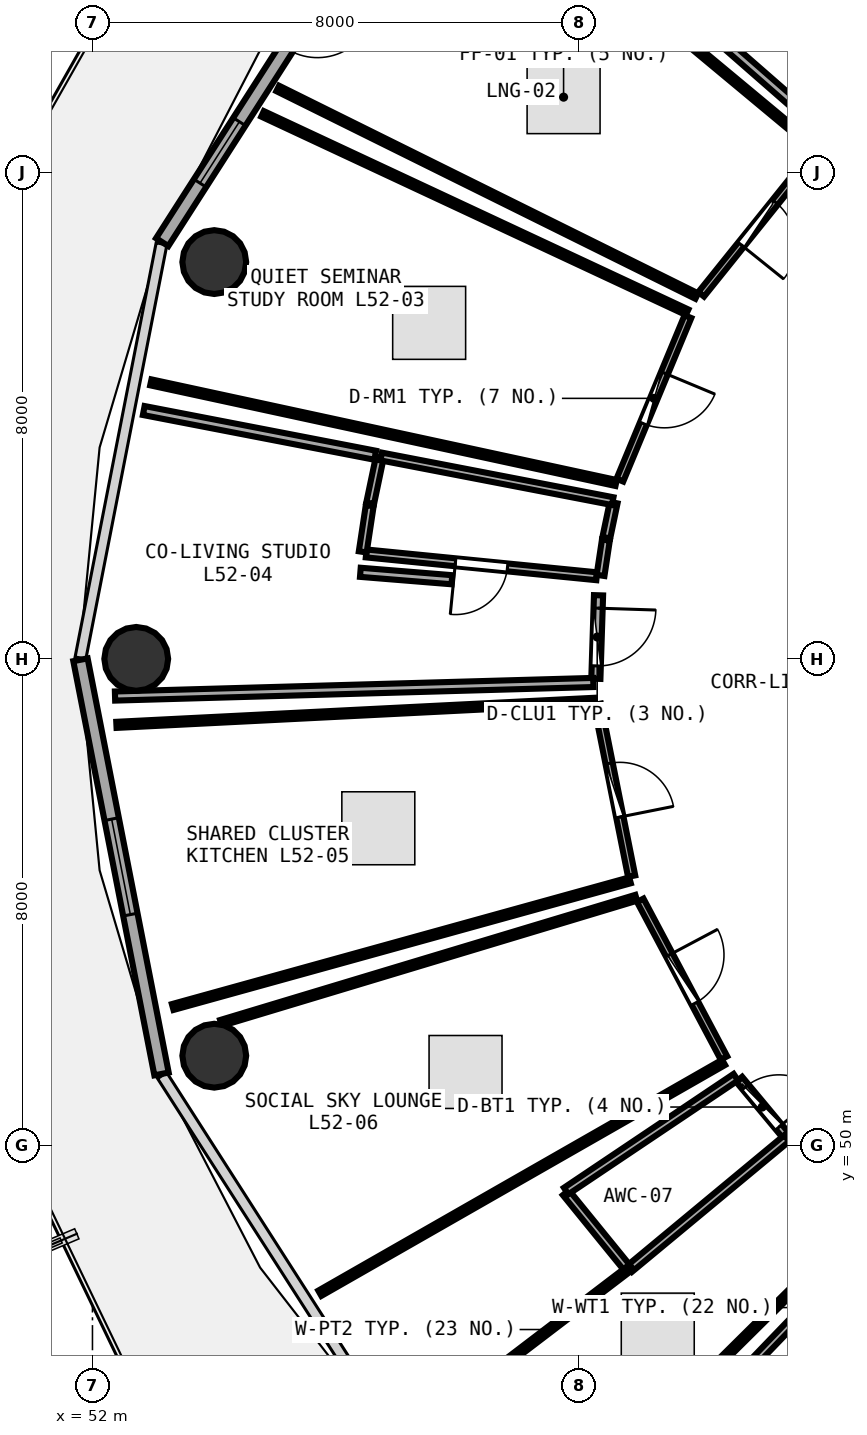
"""IFC4 building model, lengths in metres.
Left out: names, types, materials, properties, quantities, classifications, styles, units other than length and angle.
Written with IfcOpenShell. Run it as: python <this file> out.ifc"""

import sys

from ifc_helpers import new_model, si_unit, direction, frame, frame_2d, origin, origin_2d, place, context, subcontext, project, spatial, rectangle, circle, extrude, element, fill, save


model = new_model("IFC4")
c1 = context("Model", 3, precision=1e-05, world=origin(), true_north=direction((0.0, 1.0)))
c2 = subcontext(c1, "Body", "Model", "MODEL_VIEW")
j1 = project(units=[si_unit("LENGTHUNIT", "METRE"), si_unit("PLANEANGLEUNIT", "RADIAN")], contexts=[c1])
p1 = place(None, origin())
s1 = spatial("IfcSite", under=j1, at=p1, CompositionType="ELEMENT")
p2 = place(p1, origin())
s2 = spatial("IfcBuilding", under=s1, at=p2, CompositionType="ELEMENT")
p3 = place(p2, frame((0.0, 0.0, 204.45)))
s3 = spatial("IfcBuildingStorey", under=s2, at=p3, CompositionType="ELEMENT", Elevation=204.45)
for number, where, z_axis, x_axis in (
    (1, (54.003, 64.526, 0.0), (0.0, 0.0, 1.0), (1.0, 0.0, 0.0)),
    (2, (52.72, 58.0, 0.0), (0.0, 0.0, 1.0), (1.0, 0.0, 0.0)),
    (3, (54.003, 51.474, 0.0), (0.0, 0.0, 1.0), (1.0, 0.0, 0.0)),
):
    element("IfcColumn", number, at=place(p3, frame(where, z_axis=z_axis, x_axis=x_axis)), inside=s3, PredefinedType="COLUMN", context=c2, shape_type="SweptSolid", body=[
        extrude(circle(Radius=0.525, at=origin_2d()), origin(), (0.0, 0.0, 1.0), 3.75),
    ])
p4 = place(p3, frame((56.986, 70.843, 0.0), z_axis=(0.0, 0.0, 1.0), x_axis=(-0.539539512973, -0.841960280501, 0.0)))
e4 = element("IfcWall", 4, at=p4, inside=s3, PredefinedType="SOLIDWALL", context=c2, shape_type="SweptSolid", body=[
    extrude(rectangle(XDim=7.115, YDim=0.24, at=frame_2d((3.557, 0.0))), origin(), (0.0, 0.0, 1.0), 3.475),
])
p5 = place(p4, frame((2.382, 0.0, 0.0)))
e5 = element("IfcOpeningElement", 5, at=p5, cuts=e4, PredefinedType="OPENING", context=c2, shape_type="SweptSolid", body=[
    extrude(rectangle(XDim=0.95, YDim=2.1, at=frame_2d((0.475, 1.05))), frame((0.0, 0.13, 0.0), z_axis=(0.0, -1.0, 0.0), x_axis=(1.0, 0.0, 0.0)), (0.0, 0.0, 1.0), 0.26),
])
p6 = place(p4, frame((4.762, 0.0, 0.85)))
e6 = element("IfcOpeningElement", 6, at=p6, cuts=e4, PredefinedType="OPENING", context=c2, shape_type="SweptSolid", body=[
    extrude(rectangle(XDim=1.2, YDim=1.45, at=frame_2d((0.6, 0.725))), frame((0.0, 0.13, 0.0), z_axis=(0.0, -1.0, 0.0), x_axis=(1.0, 0.0, 0.0)), (0.0, 0.0, 1.0), 0.26),
])
p7 = place(p3, frame((51.803, 57.985, 0.0), z_axis=(0.0, 0.0, 1.0), x_axis=(0.192069055673, -0.981381413036, 0.0)))
e7 = element("IfcWall", 7, at=p7, inside=s3, PredefinedType="SOLIDWALL", context=c2, shape_type="SweptSolid", body=[
    extrude(rectangle(XDim=6.94, YDim=0.24, at=frame_2d((3.47, 0.0))), origin(), (0.0, 0.0, 1.0), 3.475),
])
p8 = place(p7, frame((2.67, 0.0, 0.85)))
e8 = element("IfcOpeningElement", 8, at=p8, cuts=e7, PredefinedType="OPENING", context=c2, shape_type="SweptSolid", body=[
    extrude(rectangle(XDim=1.6, YDim=1.45, at=frame_2d((0.8, 0.725))), frame((0.0, 0.13, 0.0), z_axis=(0.0, -1.0, 0.0), x_axis=(1.0, 0.0, 0.0)), (0.0, 0.0, 1.0), 0.26),
])
p9 = place(p3, frame((65.56, 67.798, 0.0), z_axis=(0.0, 0.0, 1.0), x_axis=(-0.652591857515, 0.757709619515, 0.0)))
e9 = element("IfcWall", 9, at=p9, inside=s3, PredefinedType="PLUMBINGWALL", context=c2, shape_type="SweptSolid", body=[
    extrude(rectangle(XDim=3.57, YDim=0.13, at=frame_2d((1.785, 0.0))), origin(), (0.0, 0.0, 1.0), 3.025),
])
p10 = place(p9, frame((1.355, 0.0, 0.0)))
e10 = element("IfcOpeningElement", 10, at=p10, cuts=e9, PredefinedType="OPENING", context=c2, shape_type="SweptSolid", body=[
    extrude(rectangle(XDim=0.86, YDim=2.05, at=frame_2d((0.43, 1.025))), frame((0.0, 0.075, 0.0), z_axis=(0.0, -1.0, 0.0), x_axis=(1.0, 0.0, 0.0)), (0.0, 0.0, 1.0), 0.15),
])
p11 = place(p3, frame((63.885, 66.327, 0.0), z_axis=(0.0, 0.0, 1.0), x_axis=(-0.626276824741, -0.779600756023, 0.0)))
e11 = element("IfcWall", 11, at=p11, inside=s3, PredefinedType="PARTITIONING", context=c2, shape_type="SweptSolid", body=[
    extrude(rectangle(XDim=2.99, YDim=0.12, at=frame_2d((1.495, 0.0))), origin(), (0.0, 0.0, 1.0), 3.025),
])
p12 = place(p11, frame((1.045, 0.0, 0.0)))
e12 = element("IfcOpeningElement", 12, at=p12, cuts=e11, PredefinedType="OPENING", context=c2, shape_type="SweptSolid", body=[
    extrude(rectangle(XDim=0.9, YDim=2.08, at=frame_2d((0.45, 1.04))), frame((0.0, 0.07, 0.0), z_axis=(0.0, -1.0, 0.0), x_axis=(1.0, 0.0, 0.0)), (0.0, 0.0, 1.0), 0.14),
])
p13 = place(p3, frame((61.793, 63.629, 0.0), z_axis=(0.0, 0.0, 1.0), x_axis=(-0.384145151494, -0.923272713007, 0.0)))
e13 = element("IfcWall", 13, at=p13, inside=s3, PredefinedType="PARTITIONING", context=c2, shape_type="SweptSolid", body=[
    extrude(rectangle(XDim=2.913, YDim=0.12, at=frame_2d((1.456, 0.0))), origin(), (0.0, 0.0, 1.0), 3.235),
])
p14 = place(p13, frame((1.006, 0.0, 0.0)))
e14 = element("IfcOpeningElement", 14, at=p14, cuts=e13, PredefinedType="OPENING", context=c2, shape_type="SweptSolid", body=[
    extrude(rectangle(XDim=0.9, YDim=2.08, at=frame_2d((0.45, 1.04))), frame((0.0, 0.07, 0.0), z_axis=(0.0, -1.0, 0.0), x_axis=(1.0, 0.0, 0.0)), (0.0, 0.0, 1.0), 0.14),
])
p15 = place(p3, frame((60.293, 59.359, 0.0), z_axis=(0.0, 0.0, 1.0), x_axis=(-0.995138182823, 0.098488563232, 0.0)))
e15 = element("IfcWall", 15, at=p15, inside=s3, PredefinedType="PLUMBINGWALL", context=c2, shape_type="SweptSolid", body=[
    extrude(rectangle(XDim=3.81, YDim=0.13, at=frame_2d((1.905, 0.0))), origin(), (0.0, 0.0, 1.0), 3.175),
])
p16 = place(p15, frame((1.475, 0.0, 0.0)))
e16 = element("IfcOpeningElement", 16, at=p16, cuts=e15, PredefinedType="OPENING", context=c2, shape_type="SweptSolid", body=[
    extrude(rectangle(XDim=0.86, YDim=2.05, at=frame_2d((0.43, 1.025))), frame((0.0, 0.075, 0.0), z_axis=(0.0, -1.0, 0.0), x_axis=(1.0, 0.0, 0.0)), (0.0, 0.0, 1.0), 0.15),
])
p17 = place(p3, frame((60.323, 59.046, 0.0), z_axis=(0.0, 0.0, 1.0), x_axis=(-0.032172559415, -0.999482329219, 0.0)))
e17 = element("IfcWall", 17, at=p17, inside=s3, PredefinedType="PARTITIONING", context=c2, shape_type="SweptSolid", body=[
    extrude(rectangle(XDim=1.374, YDim=0.15, at=frame_2d((0.687, 0.0))), origin(), (0.0, 0.0, 1.0), 3.025),
])
p18 = place(p17, frame((0.212, 0.0, 0.0)))
e18 = element("IfcOpeningElement", 18, at=p18, cuts=e17, PredefinedType="OPENING", context=c2, shape_type="SweptSolid", body=[
    extrude(rectangle(XDim=0.95, YDim=2.08, at=frame_2d((0.475, 1.04))), frame((0.0, 0.085, 0.0), z_axis=(0.0, -1.0, 0.0), x_axis=(1.0, 0.0, 0.0)), (0.0, 0.0, 1.0), 0.17),
])
p19 = place(p3, frame((60.303, 57.253, 0.0), z_axis=(0.0, 0.0, 1.0), x_axis=(0.195904296331, -0.980623019656, 0.0)))
e19 = element("IfcWall", 19, at=p19, inside=s3, PredefinedType="PARTITIONING", context=c2, shape_type="SweptSolid", body=[
    extrude(rectangle(XDim=2.881, YDim=0.12, at=frame_2d((1.441, 0.0))), origin(), (0.0, 0.0, 1.0), 3.48),
])
p20 = place(p19, frame((0.991, 0.0, 0.0)))
e20 = element("IfcOpeningElement", 20, at=p20, cuts=e19, PredefinedType="OPENING", context=c2, shape_type="SweptSolid", body=[
    extrude(rectangle(XDim=0.9, YDim=2.08, at=frame_2d((0.45, 1.04))), frame((0.0, 0.07, 0.0), z_axis=(0.0, -1.0, 0.0), x_axis=(1.0, 0.0, 0.0)), (0.0, 0.0, 1.0), 0.14),
])
p21 = place(p3, frame((61.009, 54.03, 0.0), z_axis=(0.0, 0.0, 1.0), x_axis=(0.468999166779, -0.883198608219, 0.0)))
e21 = element("IfcWall", 21, at=p21, inside=s3, PredefinedType="PARTITIONING", context=c2, shape_type="SweptSolid", body=[
    extrude(rectangle(XDim=2.936, YDim=0.12, at=frame_2d((1.468, 0.0))), origin(), (0.0, 0.0, 1.0), 3.235),
])
p22 = place(p21, frame((1.018, 0.0, 0.0)))
e22 = element("IfcOpeningElement", 22, at=p22, cuts=e21, PredefinedType="OPENING", context=c2, shape_type="SweptSolid", body=[
    extrude(rectangle(XDim=0.9, YDim=2.08, at=frame_2d((0.45, 1.04))), frame((0.0, 0.07, 0.0), z_axis=(0.0, -1.0, 0.0), x_axis=(1.0, 0.0, 0.0)), (0.0, 0.0, 1.0), 0.14),
])
p23 = place(p3, frame((62.635, 51.086, 0.0), z_axis=(0.0, 0.0, 1.0), x_axis=(0.639759255057, -0.768575367526, 0.0)))
e23 = element("IfcWall", 23, at=p23, inside=s3, PredefinedType="PLUMBINGWALL", context=c2, shape_type="SweptSolid", body=[
    extrude(rectangle(XDim=1.187, YDim=0.13, at=frame_2d((0.593, 0.0))), origin(), (0.0, 0.0, 1.0), 3.025),
])
p24 = place(p23, frame((0.163, 0.0, 0.0)))
e24 = element("IfcOpeningElement", 24, at=p24, cuts=e23, PredefinedType="OPENING", context=c2, shape_type="SweptSolid", body=[
    extrude(rectangle(XDim=0.86, YDim=2.05, at=frame_2d((0.43, 1.025))), frame((0.0, 0.075, 0.0), z_axis=(0.0, -1.0, 0.0), x_axis=(1.0, 0.0, 0.0)), (0.0, 0.0, 1.0), 0.15),
])
p25 = place(p3, frame((64.123, 66.618, 0.0), z_axis=(0.0, 0.0, 1.0), x_axis=(-0.752988337425, 0.658033862124, 0.0)))
e25 = element("IfcWall", 25, at=p25, inside=s3, PredefinedType="PARTITIONING", context=c2, shape_type="SweptSolid", body=[
    extrude(rectangle(XDim=7.492, YDim=0.15, at=frame_2d((3.746, 0.0))), origin(), (0.0, 0.0, 1.0), 3.075),
])
p26 = place(p3, frame((61.938, 63.967, 0.0), z_axis=(0.0, 0.0, 1.0), x_axis=(-0.896052906747, 0.443947281003, 0.0)))
e26 = element("IfcWall", 26, at=p26, inside=s3, PredefinedType="PARTITIONING", context=c2, shape_type="SweptSolid", body=[
    extrude(rectangle(XDim=7.691, YDim=0.1, at=frame_2d((3.845, 0.0))), origin(), (0.0, 0.0, 1.0), 3.025),
])
p27 = place(p3, frame((58.117, 71.203, 0.0), z_axis=(0.0, 0.0, 1.0), x_axis=(0.768764498043, -0.63953197461, 0.0)))
e27 = element("IfcWall", 27, at=p27, inside=s3, PredefinedType="PARTITIONING", context=c2, shape_type="SweptSolid", body=[
    extrude(rectangle(XDim=7.511, YDim=0.1, at=frame_2d((3.756, 0.0))), origin(), (0.0, 0.0, 1.0), 3.025),
])
p28 = place(p3, frame((60.612, 60.893, 0.0), z_axis=(0.0, 0.0, 1.0), x_axis=(-0.977397622815, 0.211409287676, 0.0)))
e28 = element("IfcWall", 28, at=p28, inside=s3, PredefinedType="PARTITIONING", context=c2, shape_type="SweptSolid", body=[
    extrude(rectangle(XDim=7.829, YDim=0.1, at=frame_2d((3.914, 0.0))), origin(), (0.0, 0.0, 1.0), 3.075),
])
p29 = place(p3, frame((54.797, 66.963, 0.0), z_axis=(0.0, 0.0, 1.0), x_axis=(0.906002589331, -0.423272144283, 0.0)))
e29 = element("IfcWall", 29, at=p29, inside=s3, PredefinedType="PARTITIONING", context=c2, shape_type="SweptSolid", body=[
    extrude(rectangle(XDim=7.707, YDim=0.1, at=frame_2d((3.854, 0.0))), origin(), (0.0, 0.0, 1.0), 3.025),
])
p30 = place(p3, frame((60.572, 60.57, 0.0), z_axis=(0.0, 0.0, 1.0), x_axis=(-0.205112412682, -0.978738421727, 0.0)))
e30 = element("IfcWall", 30, at=p30, inside=s3, PredefinedType="PLUMBINGWALL", context=c2, shape_type="SweptSolid", body=[
    extrude(rectangle(XDim=0.589, YDim=0.13, at=frame_2d((0.294, 0.0))), origin(), (0.0, 0.0, 1.0), 3.48),
])
p31 = place(p3, frame((60.444, 59.954, 0.0), z_axis=(0.0, 0.0, 1.0), x_axis=(-0.149903785265, -0.98870058924, 0.0)))
e31 = element("IfcWall", 31, at=p31, inside=s3, PredefinedType="PLUMBINGWALL", context=c2, shape_type="SweptSolid", body=[
    extrude(rectangle(XDim=0.588, YDim=0.13, at=frame_2d((0.294, 0.0))), origin(), (0.0, 0.0, 1.0), 3.48),
])
p32 = place(p3, frame((56.445, 59.76, 0.0), z_axis=(0.0, 0.0, 1.0), x_axis=(0.149504479532, 0.988761048282, 0.0)))
e32 = element("IfcWall", 32, at=p32, inside=s3, PredefinedType="PLUMBINGWALL", context=c2, shape_type="SweptSolid", body=[
    extrude(rectangle(XDim=0.769, YDim=0.13, at=frame_2d((0.385, 0.0))), origin(), (0.0, 0.0, 1.0), 3.48),
])
p33 = place(p3, frame((56.567, 60.56, 0.0), z_axis=(0.0, 0.0, 1.0), x_axis=(0.205018710415, 0.978758054056, 0.0)))
e33 = element("IfcWall", 33, at=p33, inside=s3, PredefinedType="PLUMBINGWALL", context=c2, shape_type="SweptSolid", body=[
    extrude(rectangle(XDim=0.769, YDim=0.13, at=frame_2d((0.385, 0.0))), origin(), (0.0, 0.0, 1.0), 3.48),
])
p34 = place(p3, frame((56.749, 61.328, 0.0), z_axis=(0.0, 0.0, 1.0), x_axis=(0.981906173962, -0.189368068941, 0.0)))
e34 = element("IfcWall", 34, at=p34, inside=s3, PredefinedType="PLUMBINGWALL", context=c2, shape_type="SweptSolid", body=[
    extrude(rectangle(XDim=3.878, YDim=0.13, at=frame_2d((1.939, 0.0))), origin(), (0.0, 0.0, 1.0), 3.175),
])
p35 = place(p3, frame((60.237, 57.612, 0.0), z_axis=(0.0, 0.0, 1.0), x_axis=(-0.999599617875, -0.028294945576, 0.0)))
e35 = element("IfcWall", 35, at=p35, inside=s3, PredefinedType="PARTITIONING", context=c2, shape_type="SweptSolid", body=[
    extrude(rectangle(XDim=7.869, YDim=0.15, at=frame_2d((3.935, 0.0))), origin(), (0.0, 0.0, 1.0), 3.075),
])
p36 = place(p3, frame((52.843, 62.084, 0.0), z_axis=(0.0, 0.0, 1.0), x_axis=(0.981831342876, -0.189755669601, 0.0)))
e36 = element("IfcWall", 36, at=p36, inside=s3, PredefinedType="PARTITIONING", context=c2, shape_type="SweptSolid", body=[
    extrude(rectangle(XDim=3.878, YDim=0.15, at=frame_2d((1.939, 0.0))), origin(), (0.0, 0.0, 1.0), 3.075),
])
p37 = place(p3, frame((56.406, 59.424, 0.0), z_axis=(0.0, 0.0, 1.0), x_axis=(0.996727287989, -0.080837574046, 0.0)))
e37 = element("IfcWall", 37, at=p37, inside=s3, PredefinedType="PARTITIONING", context=c2, shape_type="SweptSolid", body=[
    extrude(rectangle(XDim=1.51, YDim=0.15, at=frame_2d((0.755, 0.0))), origin(), (0.0, 0.0, 1.0), 3.48),
])
p38 = place(p3, frame((60.841, 54.358, 0.0), z_axis=(0.0, 0.0, 1.0), x_axis=(-0.963696964369, -0.266998428582, 0.0)))
e38 = element("IfcWall", 38, at=p38, inside=s3, PredefinedType="PARTITIONING", context=c2, shape_type="SweptSolid", body=[
    extrude(rectangle(XDim=7.804, YDim=0.1, at=frame_2d((3.902, 0.0))), origin(), (0.0, 0.0, 1.0), 3.075),
])
p39 = place(p3, frame((52.394, 56.915, 0.0), z_axis=(0.0, 0.0, 1.0), x_axis=(0.998738681635, 0.050210016992, 0.0)))
e39 = element("IfcWall", 39, at=p39, inside=s3, PredefinedType="PARTITIONING", context=c2, shape_type="SweptSolid", body=[
    extrude(rectangle(XDim=7.867, YDim=0.1, at=frame_2d((3.934, 0.0))), origin(), (0.0, 0.0, 1.0), 3.075),
])
p40 = place(p3, frame((62.379, 51.364, 0.0), z_axis=(0.0, 0.0, 1.0), x_axis=(-0.868127220156, -0.496341746808, 0.0)))
e40 = element("IfcWall", 40, at=p40, inside=s3, PredefinedType="PARTITIONING", context=c2, shape_type="SweptSolid", body=[
    extrude(rectangle(XDim=7.648, YDim=0.1, at=frame_2d((3.824, 0.0))), origin(), (0.0, 0.0, 1.0), 3.025),
])
p41 = place(p3, frame((54.114, 52.013, 0.0), z_axis=(0.0, 0.0, 1.0), x_axis=(0.957454305291, 0.288584915198, 0.0)))
e41 = element("IfcWall", 41, at=p41, inside=s3, PredefinedType="PARTITIONING", context=c2, shape_type="SweptSolid", body=[
    extrude(rectangle(XDim=7.133, YDim=0.1, at=frame_2d((3.566, 0.0))), origin(), (0.0, 0.0, 1.0), 3.075),
])
p42 = place(p3, frame((63.417, 50.115, 0.0), z_axis=(0.0, 0.0, 1.0), x_axis=(-0.76963081868, -0.638489156477, 0.0)))
e42 = element("IfcWall", 42, at=p42, inside=s3, PredefinedType="PLUMBINGWALL", context=c2, shape_type="SweptSolid", body=[
    extrude(rectangle(XDim=3.36, YDim=0.13, at=frame_2d((1.68, 0.0))), origin(), (0.0, 0.0, 1.0), 3.175),
])
p43 = place(p3, frame((60.803, 47.972, 0.0), z_axis=(0.0, 0.0, 1.0), x_axis=(-0.631048835574, 0.775743106396, 0.0)))
e43 = element("IfcWall", 43, at=p43, inside=s3, PredefinedType="PLUMBINGWALL", context=c2, shape_type="SweptSolid", body=[
    extrude(rectangle(XDim=1.611, YDim=0.13, at=frame_2d((0.806, 0.0))), origin(), (0.0, 0.0, 1.0), 3.175),
])
p44 = place(p3, frame((59.791, 49.249, 0.0), z_axis=(0.0, 0.0, 1.0), x_axis=(0.830403176275, 0.557162960751, 0.0)))
e44 = element("IfcWall", 44, at=p44, inside=s3, PredefinedType="PLUMBINGWALL", context=c2, shape_type="SweptSolid", body=[
    extrude(rectangle(XDim=3.36, YDim=0.13, at=frame_2d((1.68, 0.0))), origin(), (0.0, 0.0, 1.0), 3.025),
])
p45 = place(p3, frame((64.745, 48.841, 0.0), z_axis=(0.0, 0.0, 1.0), x_axis=(-0.710363664194, -0.703834827635, 0.0)))
e45 = element("IfcWall", 45, at=p45, inside=s3, PredefinedType="PARTITIONING", context=c2, shape_type="SweptSolid", body=[
    extrude(rectangle(XDim=7.441, YDim=0.1, at=frame_2d((3.721, 0.0))), origin(), (0.0, 0.0, 1.0), 3.075),
])
p46 = place(p3, frame((58.197, 45.969, 0.0), z_axis=(0.0, 0.0, 1.0), x_axis=(0.79535379018, 0.606145484555, 0.0)))
e46 = element("IfcWall", 46, at=p46, inside=s3, PredefinedType="PARTITIONING", context=c2, shape_type="SweptSolid", body=[
    extrude(rectangle(XDim=3.308, YDim=0.1, at=frame_2d((1.654, 0.0))), origin(), (0.0, 0.0, 1.0), 3.025),
])
p47 = place(p3, frame((62.465, 46.01, 0.0), z_axis=(0.0, 0.0, 1.0), x_axis=(0.693241598237, 0.720705270186, 0.0)))
e47 = element("IfcWall", 47, at=p47, inside=s3, PredefinedType="PLUMBINGWALL", context=c2, shape_type="SweptSolid", body=[
    extrude(rectangle(XDim=3.671, YDim=0.13, at=frame_2d((1.836, 0.0))), origin(), (0.0, 0.0, 1.0), 3.175),
])
p48 = place(p6, origin())
e48 = element("IfcWindow", 48, at=p48, inside=s3, PartitioningType="SINGLE_PANEL", PredefinedType="WINDOW", context=c2, shape_type="SweptSolid", body=[
    extrude(rectangle(XDim=1.2, YDim=1.45, at=frame_2d((0.6, 0.725))), frame((0.0, 0.03, 0.0), z_axis=(0.0, -1.0, 0.0), x_axis=(1.0, 0.0, 0.0)), (0.0, 0.0, 1.0), 0.06),
])
fill(e6, e48)
p49 = place(p8, origin())
e49 = element("IfcWindow", 49, at=p49, inside=s3, PartitioningType="SINGLE_PANEL", PredefinedType="WINDOW", context=c2, shape_type="SweptSolid", body=[
    extrude(rectangle(XDim=1.6, YDim=1.45, at=frame_2d((0.8, 0.725))), frame((0.0, 0.03, 0.0), z_axis=(0.0, -1.0, 0.0), x_axis=(1.0, 0.0, 0.0)), (0.0, 0.0, 1.0), 0.06),
])
fill(e8, e49)
p50 = place(p12, origin())
e50 = element("IfcDoor", 50, at=p50, inside=s3, OperationType="SINGLE_SWING_RIGHT", PredefinedType="DOOR", context=c2, shape_type="SweptSolid", body=[
    extrude(rectangle(XDim=0.9, YDim=2.08, at=frame_2d((0.45, 1.04))), frame((0.0, 0.025, 0.0), z_axis=(0.0, -1.0, 0.0), x_axis=(1.0, 0.0, 0.0)), (0.0, 0.0, 1.0), 0.05),
])
fill(e12, e50)
p51 = place(p14, origin())
e51 = element("IfcDoor", 51, at=p51, inside=s3, OperationType="SINGLE_SWING_LEFT", PredefinedType="DOOR", context=c2, shape_type="SweptSolid", body=[
    extrude(rectangle(XDim=0.9, YDim=2.08, at=frame_2d((0.45, 1.04))), frame((0.0, 0.025, 0.0), z_axis=(0.0, -1.0, 0.0), x_axis=(1.0, 0.0, 0.0)), (0.0, 0.0, 1.0), 0.05),
])
fill(e14, e51)
p52 = place(p16, origin())
e52 = element("IfcDoor", 52, at=p52, inside=s3, OperationType="SINGLE_SWING_RIGHT", PredefinedType="DOOR", context=c2, shape_type="SweptSolid", body=[
    extrude(rectangle(XDim=0.86, YDim=2.05, at=frame_2d((0.43, 1.025))), frame((0.0, 0.025, 0.0), z_axis=(0.0, -1.0, 0.0), x_axis=(1.0, 0.0, 0.0)), (0.0, 0.0, 1.0), 0.05),
])
fill(e16, e52)
p53 = place(p18, origin())
e53 = element("IfcDoor", 53, at=p53, inside=s3, OperationType="SINGLE_SWING_LEFT", PredefinedType="DOOR", context=c2, shape_type="SweptSolid", body=[
    extrude(rectangle(XDim=0.95, YDim=2.08, at=frame_2d((0.475, 1.04))), frame((0.0, 0.025, 0.0), z_axis=(0.0, -1.0, 0.0), x_axis=(1.0, 0.0, 0.0)), (0.0, 0.0, 1.0), 0.05),
])
fill(e18, e53)
p54 = place(p20, origin())
e54 = element("IfcDoor", 54, at=p54, inside=s3, OperationType="SINGLE_SWING_RIGHT", PredefinedType="DOOR", context=c2, shape_type="SweptSolid", body=[
    extrude(rectangle(XDim=0.9, YDim=2.08, at=frame_2d((0.45, 1.04))), frame((0.0, 0.025, 0.0), z_axis=(0.0, -1.0, 0.0), x_axis=(1.0, 0.0, 0.0)), (0.0, 0.0, 1.0), 0.05),
])
fill(e20, e54)
p55 = place(p22, origin())
e55 = element("IfcDoor", 55, at=p55, inside=s3, OperationType="SINGLE_SWING_LEFT", PredefinedType="DOOR", context=c2, shape_type="SweptSolid", body=[
    extrude(rectangle(XDim=0.9, YDim=2.08, at=frame_2d((0.45, 1.04))), frame((0.0, 0.025, 0.0), z_axis=(0.0, -1.0, 0.0), x_axis=(1.0, 0.0, 0.0)), (0.0, 0.0, 1.0), 0.05),
])
fill(e22, e55)
p56 = place(p24, origin())
e56 = element("IfcDoor", 56, at=p56, inside=s3, OperationType="SINGLE_SWING_RIGHT", PredefinedType="DOOR", context=c2, shape_type="SweptSolid", body=[
    extrude(rectangle(XDim=0.86, YDim=2.05, at=frame_2d((0.43, 1.025))), frame((0.0, 0.025, 0.0), z_axis=(0.0, -1.0, 0.0), x_axis=(1.0, 0.0, 0.0)), (0.0, 0.0, 1.0), 0.05),
])
fill(e24, e56)
save(model, sys.argv[1])
